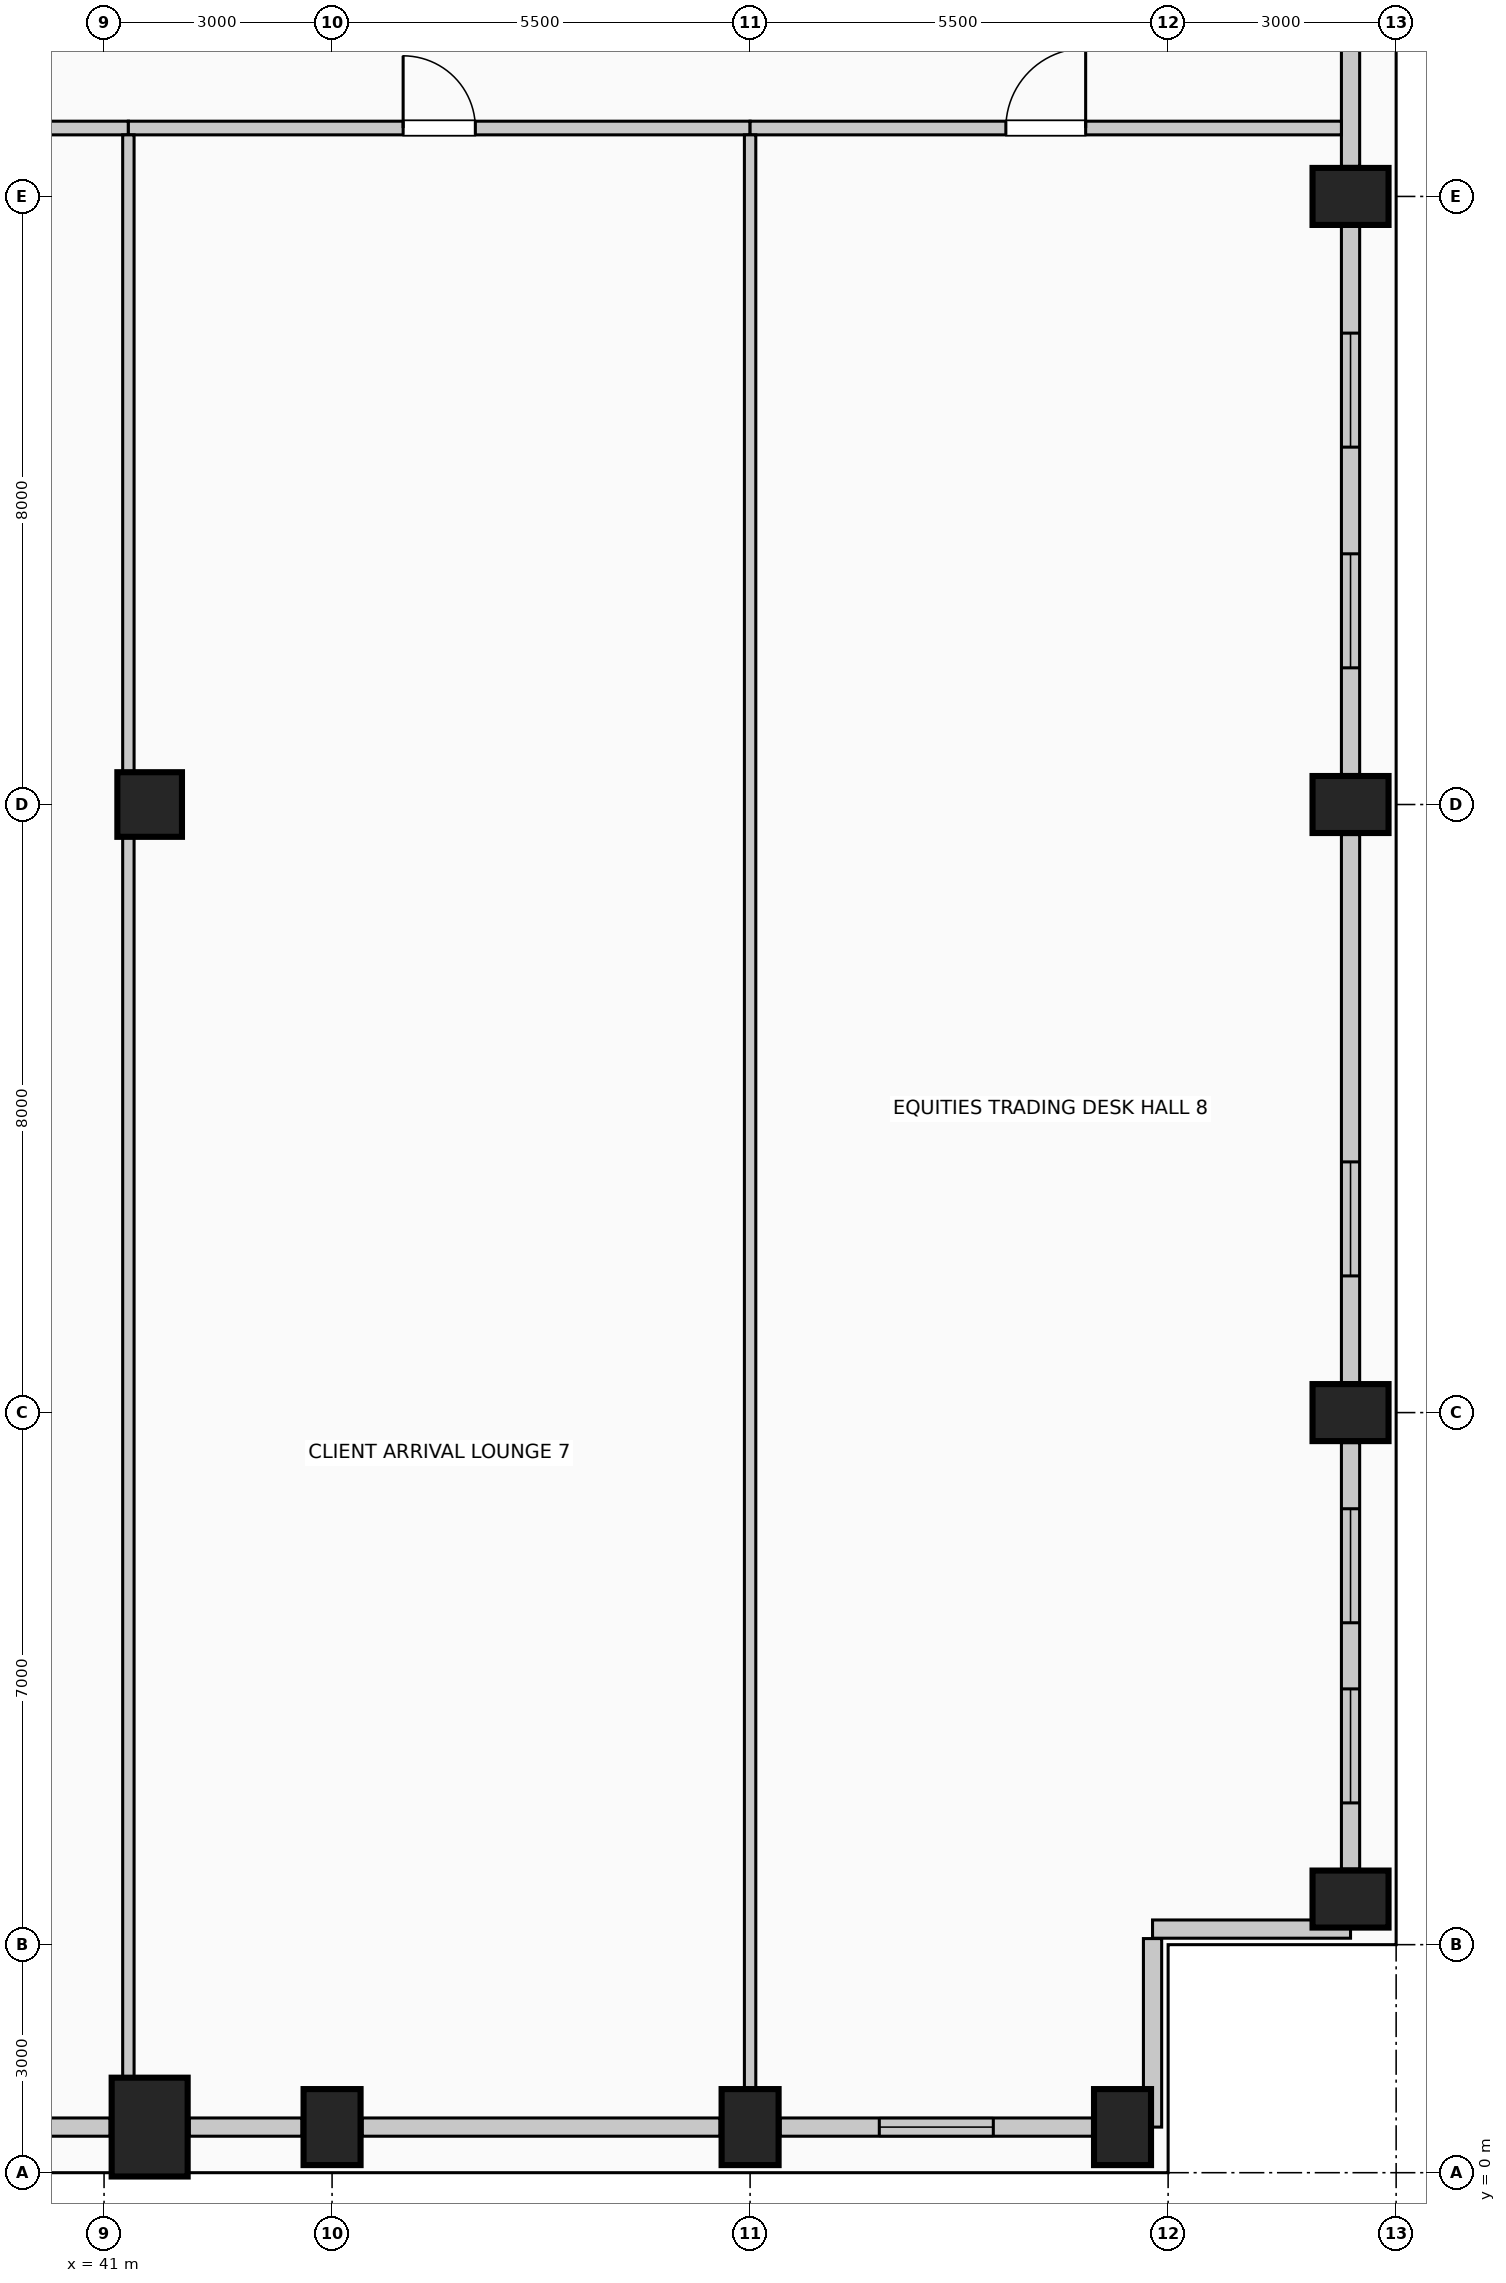
"""IFC4 building model, lengths in metres.
Left out: names, types, materials, properties, quantities, classifications, styles, units other than length and angle.
Written with IfcOpenShell. Run it as: python <this file> out.ifc"""

import sys

from ifc_helpers import new_model, si_unit, direction, frame, frame_2d, origin, origin_2d, place, context, subcontext, project, spatial, rectangle, circle, extrude, element, fill, save


model = new_model("IFC4")
c1 = context("Model", 3, precision=1e-05, world=origin(), true_north=direction((0.0, 1.0)))
c2 = subcontext(c1, "Body", "Model", "MODEL_VIEW")
j1 = project(units=[si_unit("LENGTHUNIT", "METRE"), si_unit("PLANEANGLEUNIT", "RADIAN")], contexts=[c1])
p1 = place(None, origin())
s1 = spatial("IfcSite", under=j1, at=p1, CompositionType="ELEMENT")
p2 = place(p1, origin())
s2 = spatial("IfcBuilding", under=s1, at=p2, CompositionType="ELEMENT")
p3 = place(p2, frame((0.0, 0.0, 252.6)))
s3 = spatial("IfcBuildingStorey", under=s2, at=p3, CompositionType="ELEMENT", Elevation=252.6)
p4 = place(p3, frame((41.6, 0.6, 0.0), z_axis=(0.0, 0.0, 1.0), x_axis=(1.0, 0.0, 0.0)))
e1 = element("IfcColumn", 1, at=p4, inside=s3, PredefinedType="COLUMN", context=c2, shape_type="SweptSolid", body=[
    extrude(rectangle(XDim=1.0, YDim=1.3, at=origin_2d()), origin(), (0.0, 0.0, 1.0), 4.0),
])
for number, where, z_axis, x_axis in (
    (2, (44.0, 0.6, 0.0), (0.0, 0.0, 1.0), (1.0, 0.0, 0.0)),
    (3, (49.5, 0.6, 0.0), (0.0, 0.0, 1.0), (1.0, 0.0, 0.0)),
    (4, (54.4, 0.6, 0.0), (0.0, 0.0, 1.0), (1.0, 0.0, 0.0)),
    (5, (57.4, 3.6, 0.0), (0.0, 0.0, 1.0), (0.0, 1.0, 0.0)),
    (6, (57.4, 10.0, 0.0), (0.0, 0.0, 1.0), (0.0, 1.0, 0.0)),
    (7, (57.4, 18.0, 0.0), (0.0, 0.0, 1.0), (0.0, 1.0, 0.0)),
    (8, (57.4, 26.0, 0.0), (0.0, 0.0, 1.0), (0.0, 1.0, 0.0)),
):
    element("IfcColumn", number, at=place(p3, frame(where, z_axis=z_axis, x_axis=x_axis)), inside=s3, PredefinedType="COLUMN", context=c2, shape_type="SweptSolid", body=[
        extrude(rectangle(XDim=0.75, YDim=1.0, at=origin_2d()), origin(), (0.0, 0.0, 1.0), 4.0),
    ])
p5 = place(p3, frame((41.6, 18.0, 0.0), z_axis=(0.0, 0.0, 1.0), x_axis=(1.0, 0.0, 0.0)))
e9 = element("IfcColumn", 9, at=p5, inside=s3, PredefinedType="COLUMN", context=c2, shape_type="SweptSolid", body=[
    extrude(circle(Radius=0.425, at=origin_2d()), origin(), (0.0, 0.0, 1.0), 4.0),
])
p6 = place(p3, frame((41.08, 0.6, 0.0), z_axis=(0.0, 0.0, 1.0), x_axis=(-1.0, 0.0, 0.0)))
e10 = element("IfcWall", 10, at=p6, inside=s3, PredefinedType="SOLIDWALL", context=c2, shape_type="SweptSolid", body=[
    extrude(rectangle(XDim=6.56, YDim=0.24, at=frame_2d((3.28, 0.0))), origin(), (0.0, 0.0, 1.0), 3.0),
])
p7 = place(p6, frame((1.187, 0.0, 0.42)))
e11 = element("IfcOpeningElement", 11, at=p7, cuts=e10, PredefinedType="OPENING", context=c2, shape_type="SweptSolid", body=[
    extrude(rectangle(XDim=1.5, YDim=2.2, at=frame_2d((0.75, 1.1))), frame((0.0, 0.13, 0.0), z_axis=(0.0, -1.0, 0.0), x_axis=(1.0, 0.0, 0.0)), (0.0, 0.0, 1.0), 0.26),
])
p8 = place(p6, frame((3.873, 0.0, 0.42)))
e12 = element("IfcOpeningElement", 12, at=p8, cuts=e10, PredefinedType="OPENING", context=c2, shape_type="SweptSolid", body=[
    extrude(rectangle(XDim=1.5, YDim=2.2, at=frame_2d((0.75, 1.1))), frame((0.0, 0.13, 0.0), z_axis=(0.0, -1.0, 0.0), x_axis=(1.0, 0.0, 0.0)), (0.0, 0.0, 1.0), 0.26),
])
p9 = place(p3, frame((43.605, 0.6, 0.0), z_axis=(0.0, 0.0, 1.0), x_axis=(-1.0, 0.0, 0.0)))
e13 = element("IfcWall", 13, at=p9, inside=s3, PredefinedType="SOLIDWALL", context=c2, shape_type="SweptSolid", body=[
    extrude(rectangle(XDim=1.485, YDim=0.24, at=frame_2d((0.742, 0.0))), origin(), (0.0, 0.0, 1.0), 3.0),
])
p10 = place(p3, frame((49.105, 0.6, 0.0), z_axis=(0.0, 0.0, 1.0), x_axis=(-1.0, 0.0, 0.0)))
e14 = element("IfcWall", 14, at=p10, inside=s3, PredefinedType="SOLIDWALL", context=c2, shape_type="SweptSolid", body=[
    extrude(rectangle(XDim=4.71, YDim=0.24, at=frame_2d((2.355, 0.0))), origin(), (0.0, 0.0, 1.0), 3.0),
])
p11 = place(p3, frame((54.005, 0.6, 0.0), z_axis=(0.0, 0.0, 1.0), x_axis=(-1.0, 0.0, 0.0)))
e15 = element("IfcWall", 15, at=p11, inside=s3, PredefinedType="SOLIDWALL", context=c2, shape_type="SweptSolid", body=[
    extrude(rectangle(XDim=4.11, YDim=0.24, at=frame_2d((2.055, 0.0))), origin(), (0.0, 0.0, 1.0), 3.0),
])
p12 = place(p11, frame((1.305, 0.0, 0.42)))
e16 = element("IfcOpeningElement", 16, at=p12, cuts=e15, PredefinedType="OPENING", context=c2, shape_type="SweptSolid", body=[
    extrude(rectangle(XDim=1.5, YDim=2.2, at=frame_2d((0.75, 1.1))), frame((0.0, 0.13, 0.0), z_axis=(0.0, -1.0, 0.0), x_axis=(1.0, 0.0, 0.0)), (0.0, 0.0, 1.0), 0.26),
])
p13 = place(p3, frame((57.4, 9.605, 0.0), z_axis=(0.0, 0.0, 1.0), x_axis=(0.0, -1.0, 0.0)))
e17 = element("IfcWall", 17, at=p13, inside=s3, PredefinedType="SOLIDWALL", context=c2, shape_type="SweptSolid", body=[
    extrude(rectangle(XDim=5.61, YDim=0.24, at=frame_2d((2.805, 0.0))), origin(), (0.0, 0.0, 1.0), 3.0),
])
p14 = place(p13, frame((0.87, 0.0, 0.42)))
e18 = element("IfcOpeningElement", 18, at=p14, cuts=e17, PredefinedType="OPENING", context=c2, shape_type="SweptSolid", body=[
    extrude(rectangle(XDim=1.5, YDim=2.2, at=frame_2d((0.75, 1.1))), frame((0.0, 0.13, 0.0), z_axis=(0.0, -1.0, 0.0), x_axis=(1.0, 0.0, 0.0)), (0.0, 0.0, 1.0), 0.26),
])
p15 = place(p13, frame((3.24, 0.0, 0.42)))
e19 = element("IfcOpeningElement", 19, at=p15, cuts=e17, PredefinedType="OPENING", context=c2, shape_type="SweptSolid", body=[
    extrude(rectangle(XDim=1.5, YDim=2.2, at=frame_2d((0.75, 1.1))), frame((0.0, 0.13, 0.0), z_axis=(0.0, -1.0, 0.0), x_axis=(1.0, 0.0, 0.0)), (0.0, 0.0, 1.0), 0.26),
])
p16 = place(p3, frame((57.4, 17.605, 0.0), z_axis=(0.0, 0.0, 1.0), x_axis=(0.0, -1.0, 0.0)))
e20 = element("IfcWall", 20, at=p16, inside=s3, PredefinedType="SOLIDWALL", context=c2, shape_type="SweptSolid", body=[
    extrude(rectangle(XDim=7.21, YDim=0.24, at=frame_2d((3.605, 0.0))), origin(), (0.0, 0.0, 1.0), 3.0),
])
p17 = place(p16, frame((4.307, 0.0, 0.42)))
e21 = element("IfcOpeningElement", 21, at=p17, cuts=e20, PredefinedType="OPENING", context=c2, shape_type="SweptSolid", body=[
    extrude(rectangle(XDim=1.5, YDim=2.2, at=frame_2d((0.75, 1.1))), frame((0.0, 0.13, 0.0), z_axis=(0.0, -1.0, 0.0), x_axis=(1.0, 0.0, 0.0)), (0.0, 0.0, 1.0), 0.26),
])
p18 = place(p3, frame((57.4, 25.605, 0.0), z_axis=(0.0, 0.0, 1.0), x_axis=(0.0, -1.0, 0.0)))
e22 = element("IfcWall", 22, at=p18, inside=s3, PredefinedType="SOLIDWALL", context=c2, shape_type="SweptSolid", body=[
    extrude(rectangle(XDim=7.21, YDim=0.24, at=frame_2d((3.605, 0.0))), origin(), (0.0, 0.0, 1.0), 3.0),
])
p19 = place(p18, frame((1.403, 0.0, 0.42)))
e23 = element("IfcOpeningElement", 23, at=p19, cuts=e22, PredefinedType="OPENING", context=c2, shape_type="SweptSolid", body=[
    extrude(rectangle(XDim=1.5, YDim=2.2, at=frame_2d((0.75, 1.1))), frame((0.0, 0.13, 0.0), z_axis=(0.0, -1.0, 0.0), x_axis=(1.0, 0.0, 0.0)), (0.0, 0.0, 1.0), 0.26),
])
p20 = place(p18, frame((4.307, 0.0, 0.42)))
e24 = element("IfcOpeningElement", 24, at=p20, cuts=e22, PredefinedType="OPENING", context=c2, shape_type="SweptSolid", body=[
    extrude(rectangle(XDim=1.5, YDim=2.2, at=frame_2d((0.75, 1.1))), frame((0.0, 0.13, 0.0), z_axis=(0.0, -1.0, 0.0), x_axis=(1.0, 0.0, 0.0)), (0.0, 0.0, 1.0), 0.26),
])
p21 = place(p3, frame((57.4, 33.605, 0.0), z_axis=(0.0, 0.0, 1.0), x_axis=(0.0, -1.0, 0.0)))
e25 = element("IfcWall", 25, at=p21, inside=s3, PredefinedType="SOLIDWALL", context=c2, shape_type="SweptSolid", body=[
    extrude(rectangle(XDim=7.21, YDim=0.24, at=frame_2d((3.605, 0.0))), origin(), (0.0, 0.0, 1.0), 3.0),
])
p22 = place(p3, frame((57.4, 3.205, 0.0), z_axis=(0.0, 0.0, 1.0), x_axis=(-1.0, 0.0, 0.0)))
e26 = element("IfcWall", 26, at=p22, inside=s3, PredefinedType="SOLIDWALL", context=c2, shape_type="SweptSolid", body=[
    extrude(rectangle(XDim=2.605, YDim=0.24, at=frame_2d((1.302, 0.0))), origin(), (0.0, 0.0, 1.0), 3.75),
])
p23 = place(p3, frame((54.795, 3.08, 0.0), z_axis=(0.0, 0.0, 1.0), x_axis=(0.0, -1.0, 0.0)))
e27 = element("IfcWall", 27, at=p23, inside=s3, PredefinedType="SOLIDWALL", context=c2, shape_type="SweptSolid", body=[
    extrude(rectangle(XDim=2.48, YDim=0.24, at=frame_2d((1.24, 0.0))), origin(), (0.0, 0.0, 1.0), 3.75),
])
p24 = place(p3, frame((32.12, 26.9, 0.0), z_axis=(0.0, 0.0, 1.0), x_axis=(1.0, 0.0, 0.0)))
e28 = element("IfcWall", 28, at=p24, inside=s3, PredefinedType="PARTITIONING", context=c2, shape_type="SweptSolid", body=[
    extrude(rectangle(XDim=9.2, YDim=0.18, at=frame_2d((4.6, 0.0))), origin(), (0.0, 0.0, 1.0), 3.75),
])
p25 = place(p24, frame((4.075, 0.0, 0.0)))
e29 = element("IfcOpeningElement", 29, at=p25, cuts=e28, PredefinedType="OPENING", context=c2, shape_type="SweptSolid", body=[
    extrude(rectangle(XDim=1.05, YDim=2.15, at=frame_2d((0.525, 1.075))), frame((0.0, 0.1, 0.0), z_axis=(0.0, -1.0, 0.0), x_axis=(1.0, 0.0, 0.0)), (0.0, 0.0, 1.0), 0.2),
])
p26 = place(p3, frame((41.32, 26.9, 0.0), z_axis=(0.0, 0.0, 1.0), x_axis=(1.0, 0.0, 0.0)))
e30 = element("IfcWall", 30, at=p26, inside=s3, PredefinedType="PARTITIONING", context=c2, shape_type="SweptSolid", body=[
    extrude(rectangle(XDim=8.18, YDim=0.18, at=frame_2d((4.09, 0.0))), origin(), (0.0, 0.0, 1.0), 3.75),
])
p27 = place(p26, frame((3.615, 0.0, 0.0)))
e31 = element("IfcOpeningElement", 31, at=p27, cuts=e30, PredefinedType="OPENING", context=c2, shape_type="SweptSolid", body=[
    extrude(rectangle(XDim=0.95, YDim=2.15, at=frame_2d((0.475, 1.075))), frame((0.0, 0.1, 0.0), z_axis=(0.0, -1.0, 0.0), x_axis=(1.0, 0.0, 0.0)), (0.0, 0.0, 1.0), 0.2),
])
p28 = place(p3, frame((49.5, 26.9, 0.0), z_axis=(0.0, 0.0, 1.0), x_axis=(1.0, 0.0, 0.0)))
e32 = element("IfcWall", 32, at=p28, inside=s3, PredefinedType="PARTITIONING", context=c2, shape_type="SweptSolid", body=[
    extrude(rectangle(XDim=7.78, YDim=0.18, at=frame_2d((3.89, 0.0))), origin(), (0.0, 0.0, 1.0), 3.75),
])
p29 = place(p28, frame((3.365, 0.0, 0.0)))
e33 = element("IfcOpeningElement", 33, at=p29, cuts=e32, PredefinedType="OPENING", context=c2, shape_type="SweptSolid", body=[
    extrude(rectangle(XDim=1.05, YDim=2.15, at=frame_2d((0.525, 1.075))), frame((0.0, 0.1, 0.0), z_axis=(0.0, -1.0, 0.0), x_axis=(1.0, 0.0, 0.0)), (0.0, 0.0, 1.0), 0.2),
])
p30 = place(p3, frame((41.32, 1.25, 0.0), z_axis=(0.0, 0.0, 1.0), x_axis=(0.0, 1.0, 0.0)))
e34 = element("IfcWall", 34, at=p30, inside=s3, PredefinedType="PARTITIONING", context=c2, shape_type="SweptSolid", body=[
    extrude(rectangle(XDim=16.325, YDim=0.15, at=frame_2d((8.163, 0.0))), origin(), (0.0, 0.0, 1.0), 3.195),
])
p31 = place(p3, frame((41.32, 18.425, 0.0), z_axis=(0.0, 0.0, 1.0), x_axis=(0.0, 1.0, 0.0)))
e35 = element("IfcWall", 35, at=p31, inside=s3, PredefinedType="PARTITIONING", context=c2, shape_type="SweptSolid", body=[
    extrude(rectangle(XDim=8.385, YDim=0.15, at=frame_2d((4.192, 0.0))), origin(), (0.0, 0.0, 1.0), 3.195),
])
p32 = place(p3, frame((49.5, 1.1, 0.0), z_axis=(0.0, 0.0, 1.0), x_axis=(0.0, 1.0, 0.0)))
e36 = element("IfcWall", 36, at=p32, inside=s3, PredefinedType="PARTITIONING", context=c2, shape_type="SweptSolid", body=[
    extrude(rectangle(XDim=25.71, YDim=0.15, at=frame_2d((12.855, 0.0))), origin(), (0.0, 0.0, 1.0), 3.75),
])
p33 = place(p12, origin())
e37 = element("IfcWindow", 37, at=p33, inside=s3, PartitioningType="SINGLE_PANEL", PredefinedType="WINDOW", context=c2, shape_type="SweptSolid", body=[
    extrude(rectangle(XDim=1.5, YDim=2.2, at=frame_2d((0.75, 1.1))), frame((0.0, 0.03, 0.0), z_axis=(0.0, -1.0, 0.0), x_axis=(1.0, 0.0, 0.0)), (0.0, 0.0, 1.0), 0.06),
])
fill(e16, e37)
p34 = place(p14, origin())
e38 = element("IfcWindow", 38, at=p34, inside=s3, PartitioningType="SINGLE_PANEL", PredefinedType="WINDOW", context=c2, shape_type="SweptSolid", body=[
    extrude(rectangle(XDim=1.5, YDim=2.2, at=frame_2d((0.75, 1.1))), frame((0.0, 0.03, 0.0), z_axis=(0.0, -1.0, 0.0), x_axis=(1.0, 0.0, 0.0)), (0.0, 0.0, 1.0), 0.06),
])
fill(e18, e38)
p35 = place(p15, origin())
e39 = element("IfcWindow", 39, at=p35, inside=s3, PartitioningType="SINGLE_PANEL", PredefinedType="WINDOW", context=c2, shape_type="SweptSolid", body=[
    extrude(rectangle(XDim=1.5, YDim=2.2, at=frame_2d((0.75, 1.1))), frame((0.0, 0.03, 0.0), z_axis=(0.0, -1.0, 0.0), x_axis=(1.0, 0.0, 0.0)), (0.0, 0.0, 1.0), 0.06),
])
fill(e19, e39)
p36 = place(p17, origin())
e40 = element("IfcWindow", 40, at=p36, inside=s3, PartitioningType="SINGLE_PANEL", PredefinedType="WINDOW", context=c2, shape_type="SweptSolid", body=[
    extrude(rectangle(XDim=1.5, YDim=2.2, at=frame_2d((0.75, 1.1))), frame((0.0, 0.03, 0.0), z_axis=(0.0, -1.0, 0.0), x_axis=(1.0, 0.0, 0.0)), (0.0, 0.0, 1.0), 0.06),
])
fill(e21, e40)
p37 = place(p19, origin())
e41 = element("IfcWindow", 41, at=p37, inside=s3, PartitioningType="SINGLE_PANEL", PredefinedType="WINDOW", context=c2, shape_type="SweptSolid", body=[
    extrude(rectangle(XDim=1.5, YDim=2.2, at=frame_2d((0.75, 1.1))), frame((0.0, 0.03, 0.0), z_axis=(0.0, -1.0, 0.0), x_axis=(1.0, 0.0, 0.0)), (0.0, 0.0, 1.0), 0.06),
])
fill(e23, e41)
p38 = place(p20, origin())
e42 = element("IfcWindow", 42, at=p38, inside=s3, PartitioningType="SINGLE_PANEL", PredefinedType="WINDOW", context=c2, shape_type="SweptSolid", body=[
    extrude(rectangle(XDim=1.5, YDim=2.2, at=frame_2d((0.75, 1.1))), frame((0.0, 0.03, 0.0), z_axis=(0.0, -1.0, 0.0), x_axis=(1.0, 0.0, 0.0)), (0.0, 0.0, 1.0), 0.06),
])
fill(e24, e42)
p39 = place(p27, origin())
e43 = element("IfcDoor", 43, at=p39, inside=s3, OperationType="SINGLE_SWING_LEFT", PredefinedType="DOOR", context=c2, shape_type="SweptSolid", body=[
    extrude(rectangle(XDim=0.95, YDim=2.15, at=frame_2d((0.475, 1.075))), frame((0.0, 0.025, 0.0), z_axis=(0.0, -1.0, 0.0), x_axis=(1.0, 0.0, 0.0)), (0.0, 0.0, 1.0), 0.05),
])
fill(e31, e43)
p40 = place(p29, origin())
e44 = element("IfcDoor", 44, at=p40, inside=s3, OperationType="SINGLE_SWING_RIGHT", PredefinedType="DOOR", context=c2, shape_type="SweptSolid", body=[
    extrude(rectangle(XDim=1.05, YDim=2.15, at=frame_2d((0.525, 1.075))), frame((0.0, 0.025, 0.0), z_axis=(0.0, -1.0, 0.0), x_axis=(1.0, 0.0, 0.0)), (0.0, 0.0, 1.0), 0.05),
])
fill(e33, e44)
save(model, sys.argv[1])
